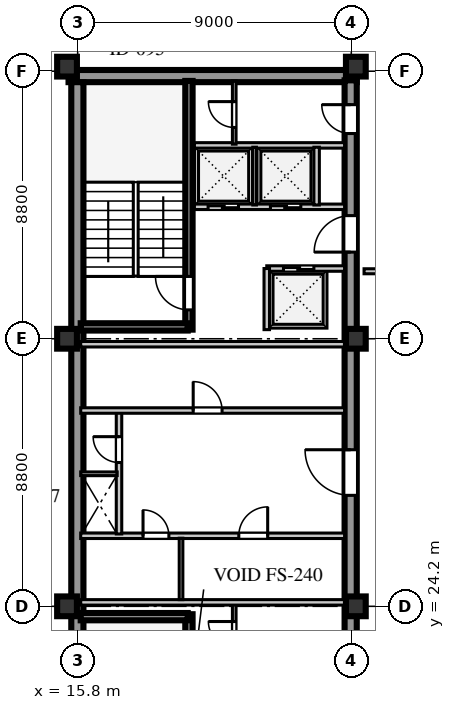
"""IFC4 building model, lengths in metres.
Left out: names, types, materials, properties, quantities, classifications, styles, units other than length and angle.
Written with IfcOpenShell. Run it as: python <this file> out.ifc"""

import sys

from ifc_helpers import new_model, si_unit, direction, frame, frame_2d, origin, origin_2d, place, context, subcontext, project, spatial, rectangle, extrude, element, fill, save


model = new_model("IFC4")
c1 = context("Model", 3, precision=1e-05, world=origin(), true_north=direction((0.0, 1.0)))
c2 = subcontext(c1, "Body", "Model", "MODEL_VIEW")
j1 = project(units=[si_unit("LENGTHUNIT", "METRE"), si_unit("PLANEANGLEUNIT", "RADIAN")], contexts=[c1])
p1 = place(None, origin())
s1 = spatial("IfcSite", under=j1, at=p1, CompositionType="ELEMENT")
p2 = place(p1, origin())
s2 = spatial("IfcBuilding", under=s1, at=p2, CompositionType="ELEMENT")
p3 = place(p2, frame((0.0, 0.0, 253.1)))
s3 = spatial("IfcBuildingStorey", under=s2, at=p3, CompositionType="ELEMENT", Elevation=253.1)
p4 = place(p3, frame((15.5, 41.64, 0.0), z_axis=(0.0, 0.0, 1.0), x_axis=(1.0, 0.0, 0.0)))
e1 = element("IfcWall", 1, at=p4, inside=s3, PredefinedType="SHEAR", context=c2, shape_type="SweptSolid", body=[
    extrude(rectangle(XDim=9.48, YDim=0.4, at=frame_2d((4.74, 0.0))), origin(), (0.0, 0.0, 1.0), 3.66),
])
p5 = place(p3, frame((15.79, 15.81, 0.0), z_axis=(0.0, 0.0, 1.0), x_axis=(0.0, 1.0, 0.0)))
e2 = element("IfcWall", 2, at=p5, inside=s3, PredefinedType="SHEAR", context=c2, shape_type="SweptSolid", body=[
    extrude(rectangle(XDim=25.63, YDim=0.4, at=frame_2d((12.815, 0.0))), origin(), (0.0, 0.0, 1.0), 3.66),
])
p6 = place(p3, frame((24.78, 15.74, 0.0), z_axis=(0.0, 0.0, 1.0), x_axis=(0.0, 1.0, 0.0)))
e3 = element("IfcWall", 3, at=p6, inside=s3, PredefinedType="SHEAR", context=c2, shape_type="SweptSolid", body=[
    extrude(rectangle(XDim=25.76, YDim=0.4, at=frame_2d((12.88, 0.0))), origin(), (0.0, 0.0, 1.0), 3.66),
])
p7 = place(p6, frame((1.61, 0.0, 0.0)))
e4 = element("IfcOpeningElement", 4, at=p7, cuts=e3, PredefinedType="OPENING", context=c2, shape_type="SweptSolid", body=[
    extrude(rectangle(XDim=1.2, YDim=2.1, at=frame_2d((0.6, 1.05))), frame((0.0, 0.21, 0.0), z_axis=(0.0, -1.0, 0.0), x_axis=(1.0, 0.0, 0.0)), (0.0, 0.0, 1.0), 0.42),
])
p8 = place(p6, frame((6.78, 0.0, 0.0)))
e5 = element("IfcOpeningElement", 5, at=p8, cuts=e3, PredefinedType="OPENING", context=c2, shape_type="SweptSolid", body=[
    extrude(rectangle(XDim=0.85, YDim=2.06, at=frame_2d((0.425, 1.03))), frame((0.0, 0.21, 0.0), z_axis=(0.0, -1.0, 0.0), x_axis=(1.0, 0.0, 0.0)), (0.0, 0.0, 1.0), 0.42),
])
p9 = place(p6, frame((12.11, 0.0, 0.0)))
e6 = element("IfcOpeningElement", 6, at=p9, cuts=e3, PredefinedType="OPENING", context=c2, shape_type="SweptSolid", body=[
    extrude(rectangle(XDim=1.5, YDim=2.12, at=frame_2d((0.75, 1.06))), frame((0.0, 0.21, 0.0), z_axis=(0.0, -1.0, 0.0), x_axis=(1.0, 0.0, 0.0)), (0.0, 0.0, 1.0), 0.42),
])
p10 = place(p6, frame((20.11, 0.0, 0.0)))
e7 = element("IfcOpeningElement", 7, at=p10, cuts=e3, PredefinedType="OPENING", context=c2, shape_type="SweptSolid", body=[
    extrude(rectangle(XDim=1.2, YDim=2.12, at=frame_2d((0.6, 1.06))), frame((0.0, 0.21, 0.0), z_axis=(0.0, -1.0, 0.0), x_axis=(1.0, 0.0, 0.0)), (0.0, 0.0, 1.0), 0.42),
])
p11 = place(p6, frame((24.01, 0.0, 0.0)))
e8 = element("IfcOpeningElement", 8, at=p11, cuts=e3, PredefinedType="OPENING", context=c2, shape_type="SweptSolid", body=[
    extrude(rectangle(XDim=0.95, YDim=2.1, at=frame_2d((0.475, 1.05))), frame((0.0, 0.21, 0.0), z_axis=(0.0, -1.0, 0.0), x_axis=(1.0, 0.0, 0.0)), (0.0, 0.0, 1.0), 0.42),
])
for number, where, z_axis, x_axis in (
    (9, (15.45, 24.2, 0.0), (0.0, 0.0, 1.0), (1.0, 0.0, 0.0)),
    (10, (15.45, 33.0, 0.0), (0.0, 0.0, 1.0), (1.0, 0.0, 0.0)),
    (11, (15.45, 41.95, 0.0), (0.0, 0.0, 1.0), (1.0, 0.0, 0.0)),
    (12, (24.95, 24.2, 0.0), (0.0, 0.0, 1.0), (1.0, 0.0, 0.0)),
    (13, (24.95, 33.0, 0.0), (0.0, 0.0, 1.0), (1.0, 0.0, 0.0)),
    (14, (24.95, 41.95, 0.0), (0.0, 0.0, 1.0), (1.0, 0.0, 0.0)),
):
    element("IfcColumn", number, at=place(p3, frame(where, z_axis=z_axis, x_axis=x_axis)), inside=s3, PredefinedType="COLUMN", context=c2, shape_type="SweptSolid", body=[
        extrude(rectangle(XDim=0.65, YDim=0.65, at=origin_2d()), origin(), (0.0, 0.0, 1.0), 3.66),
    ])
p12 = place(p3, frame((19.46, 15.74, 0.0), z_axis=(0.0, 0.0, 1.0), x_axis=(0.0, 1.0, 0.0)))
e15 = element("IfcWall", 15, at=p12, inside=s3, PredefinedType="SHEAR", context=c2, shape_type="SweptSolid", body=[
    extrude(rectangle(XDim=8.2, YDim=0.24, at=frame_2d((4.1, 0.0))), origin(), (0.0, 0.0, 1.0), 3.9),
])
p13 = place(p12, frame((0.45, 0.0, 0.0)))
e16 = element("IfcOpeningElement", 16, at=p13, cuts=e15, PredefinedType="OPENING", context=c2, shape_type="SweptSolid", body=[
    extrude(rectangle(XDim=1.1, YDim=2.1, at=frame_2d((0.55, 1.05))), frame((0.0, 0.13, 0.0), z_axis=(0.0, -1.0, 0.0), x_axis=(1.0, 0.0, 0.0)), (0.0, 0.0, 1.0), 0.26),
])
p14 = place(p3, frame((15.9, 23.86, 0.0), z_axis=(0.0, 0.0, 1.0), x_axis=(1.0, 0.0, 0.0)))
e17 = element("IfcWall", 17, at=p14, inside=s3, PredefinedType="SHEAR", context=c2, shape_type="SweptSolid", body=[
    extrude(rectangle(XDim=3.52, YDim=0.24, at=frame_2d((1.76, 0.0))), origin(), (0.0, 0.0, 1.0), 3.9),
])
p15 = place(p3, frame((20.95, 22.4, 0.0), z_axis=(0.0, 0.0, 1.0), x_axis=(0.0, 1.0, 0.0)))
e18 = element("IfcWall", 18, at=p15, inside=s3, PredefinedType="PARTITIONING", context=c2, shape_type="SweptSolid", body=[
    extrude(rectangle(XDim=1.88, YDim=0.12, at=frame_2d((0.94, 0.0))), origin(), (0.0, 0.0, 1.0), 3.66),
])
p16 = place(p15, frame((0.45, 0.0, 0.0)))
e19 = element("IfcOpeningElement", 19, at=p16, cuts=e18, PredefinedType="OPENING", context=c2, shape_type="SweptSolid", body=[
    extrude(rectangle(XDim=0.85, YDim=2.06, at=frame_2d((0.425, 1.03))), frame((0.0, 0.07, 0.0), z_axis=(0.0, -1.0, 0.0), x_axis=(1.0, 0.0, 0.0)), (0.0, 0.0, 1.0), 0.14),
])
p17 = place(p3, frame((15.9, 26.52, 0.0), z_axis=(0.0, 0.0, 1.0), x_axis=(1.0, 0.0, 0.0)))
e20 = element("IfcWall", 20, at=p17, inside=s3, PredefinedType="SOLIDWALL", context=c2, shape_type="SweptSolid", body=[
    extrude(rectangle(XDim=8.68, YDim=0.18, at=frame_2d((4.34, 0.0))), origin(), (0.0, 0.0, 1.0), 3.66),
])
p18 = place(p17, frame((2.05, 0.0, 0.0)))
e21 = element("IfcOpeningElement", 21, at=p18, cuts=e20, PredefinedType="OPENING", context=c2, shape_type="SweptSolid", body=[
    extrude(rectangle(XDim=0.85, YDim=2.06, at=frame_2d((0.425, 1.03))), frame((0.0, 0.1, 0.0), z_axis=(0.0, -1.0, 0.0), x_axis=(1.0, 0.0, 0.0)), (0.0, 0.0, 1.0), 0.2),
])
p19 = place(p17, frame((5.2, 0.0, 0.0)))
e22 = element("IfcOpeningElement", 22, at=p19, cuts=e20, PredefinedType="OPENING", context=c2, shape_type="SweptSolid", body=[
    extrude(rectangle(XDim=0.95, YDim=2.1, at=frame_2d((0.475, 1.05))), frame((0.0, 0.1, 0.0), z_axis=(0.0, -1.0, 0.0), x_axis=(1.0, 0.0, 0.0)), (0.0, 0.0, 1.0), 0.2),
])
p20 = place(p3, frame((15.9, 24.33, 0.0), z_axis=(0.0, 0.0, 1.0), x_axis=(1.0, 0.0, 0.0)))
e23 = element("IfcWall", 23, at=p20, inside=s3, PredefinedType="SOLIDWALL", context=c2, shape_type="SweptSolid", body=[
    extrude(rectangle(XDim=8.68, YDim=0.18, at=frame_2d((4.34, 0.0))), origin(), (0.0, 0.0, 1.0), 3.06),
])
p21 = place(p3, frame((19.2, 24.42, 0.0), z_axis=(0.0, 0.0, 1.0), x_axis=(0.0, 1.0, 0.0)))
e24 = element("IfcWall", 24, at=p21, inside=s3, PredefinedType="PARTITIONING", context=c2, shape_type="SweptSolid", body=[
    extrude(rectangle(XDim=2.02, YDim=0.12, at=frame_2d((1.01, 0.0))), origin(), (0.0, 0.0, 1.0), 3.66),
])
p22 = place(p3, frame((17.16, 26.58, 0.0), z_axis=(0.0, 0.0, 1.0), x_axis=(0.0, 1.0, 0.0)))
e25 = element("IfcWall", 25, at=p22, inside=s3, PredefinedType="SOLIDWALL", context=c2, shape_type="SweptSolid", body=[
    extrude(rectangle(XDim=4.02, YDim=0.18, at=frame_2d((2.01, 0.0))), origin(), (0.0, 0.0, 1.0), 3.66),
])
p23 = place(p22, frame((2.35, 0.0, 0.0)))
e26 = element("IfcOpeningElement", 26, at=p23, cuts=e25, PredefinedType="OPENING", context=c2, shape_type="SweptSolid", body=[
    extrude(rectangle(XDim=0.85, YDim=2.06, at=frame_2d((0.425, 1.03))), frame((0.0, 0.1, 0.0), z_axis=(0.0, -1.0, 0.0), x_axis=(1.0, 0.0, 0.0)), (0.0, 0.0, 1.0), 0.2),
])
p24 = place(p3, frame((15.9, 28.56, 0.0), z_axis=(0.0, 0.0, 1.0), x_axis=(1.0, 0.0, 0.0)))
e27 = element("IfcWall", 27, at=p24, inside=s3, PredefinedType="PARTITIONING", context=c2, shape_type="SweptSolid", body=[
    extrude(rectangle(XDim=1.2, YDim=0.12, at=frame_2d((0.6, 0.0))), origin(), (0.0, 0.0, 1.0), 3.66),
])
p25 = place(p3, frame((15.9, 30.64, 0.0), z_axis=(0.0, 0.0, 1.0), x_axis=(1.0, 0.0, 0.0)))
e28 = element("IfcWall", 28, at=p25, inside=s3, PredefinedType="SOLIDWALL", context=c2, shape_type="SweptSolid", body=[
    extrude(rectangle(XDim=8.68, YDim=0.18, at=frame_2d((4.34, 0.0))), origin(), (0.0, 0.0, 1.0), 3.66),
])
p26 = place(p25, frame((3.7, 0.0, 0.0)))
e29 = element("IfcOpeningElement", 29, at=p26, cuts=e28, PredefinedType="OPENING", context=c2, shape_type="SweptSolid", body=[
    extrude(rectangle(XDim=0.95, YDim=2.1, at=frame_2d((0.475, 1.05))), frame((0.0, 0.1, 0.0), z_axis=(0.0, -1.0, 0.0), x_axis=(1.0, 0.0, 0.0)), (0.0, 0.0, 1.0), 0.2),
])
p27 = place(p3, frame((15.9, 32.82, 0.0), z_axis=(0.0, 0.0, 1.0), x_axis=(1.0, 0.0, 0.0)))
e30 = element("IfcWall", 30, at=p27, inside=s3, PredefinedType="SOLIDWALL", context=c2, shape_type="SweptSolid", body=[
    extrude(rectangle(XDim=8.68, YDim=0.18, at=frame_2d((4.34, 0.0))), origin(), (0.0, 0.0, 1.0), 3.06),
])
p28 = place(p3, frame((19.46, 33.3, 0.0), z_axis=(0.0, 0.0, 1.0), x_axis=(0.0, 1.0, 0.0)))
e31 = element("IfcWall", 31, at=p28, inside=s3, PredefinedType="SHEAR", context=c2, shape_type="SweptSolid", body=[
    extrude(rectangle(XDim=8.18, YDim=0.24, at=frame_2d((4.09, 0.0))), origin(), (0.0, 0.0, 1.0), 3.9),
])
p29 = place(p28, frame((0.65, 0.0, 0.0)))
e32 = element("IfcOpeningElement", 32, at=p29, cuts=e31, PredefinedType="OPENING", context=c2, shape_type="SweptSolid", body=[
    extrude(rectangle(XDim=1.1, YDim=2.1, at=frame_2d((0.55, 1.05))), frame((0.0, 0.13, 0.0), z_axis=(0.0, -1.0, 0.0), x_axis=(1.0, 0.0, 0.0)), (0.0, 0.0, 1.0), 0.26),
])
p30 = place(p3, frame((15.9, 33.39, 0.0), z_axis=(0.0, 0.0, 1.0), x_axis=(1.0, 0.0, 0.0)))
e33 = element("IfcWall", 33, at=p30, inside=s3, PredefinedType="SHEAR", context=c2, shape_type="SweptSolid", body=[
    extrude(rectangle(XDim=3.52, YDim=0.24, at=frame_2d((1.76, 0.0))), origin(), (0.0, 0.0, 1.0), 3.9),
])
p31 = place(p3, frame((22.02, 35.31, 0.0), z_axis=(0.0, 0.0, 1.0), x_axis=(1.0, 0.0, 0.0)))
e34 = element("IfcWall", 34, at=p31, inside=s3, PredefinedType="SOLIDWALL", context=c2, shape_type="SweptSolid", body=[
    extrude(rectangle(XDim=2.56, YDim=0.18, at=frame_2d((1.28, 0.0))), origin(), (0.0, 0.0, 1.0), 3.66),
])
p32 = place(p31, frame((0.55, 0.0, 0.0)))
e35 = element("IfcOpeningElement", 35, at=p32, cuts=e34, PredefinedType="OPENING", context=c2, shape_type="SweptSolid", body=[
    extrude(rectangle(XDim=1.0, YDim=2.1, at=frame_2d((0.5, 1.05))), frame((0.0, 0.1, 0.0), z_axis=(0.0, -1.0, 0.0), x_axis=(1.0, 0.0, 0.0)), (0.0, 0.0, 1.0), 0.2),
])
p33 = place(p3, frame((22.02, 33.3, 0.0), z_axis=(0.0, 0.0, 1.0), x_axis=(0.0, 1.0, 0.0)))
e36 = element("IfcWall", 36, at=p33, inside=s3, PredefinedType="SOLIDWALL", context=c2, shape_type="SweptSolid", body=[
    extrude(rectangle(XDim=2.01, YDim=0.18, at=frame_2d((1.005, 0.0))), origin(), (0.0, 0.0, 1.0), 3.66),
])
p34 = place(p3, frame((19.64, 37.34, 0.0), z_axis=(0.0, 0.0, 1.0), x_axis=(1.0, 0.0, 0.0)))
e37 = element("IfcWall", 37, at=p34, inside=s3, PredefinedType="SOLIDWALL", context=c2, shape_type="SweptSolid", body=[
    extrude(rectangle(XDim=4.94, YDim=0.18, at=frame_2d((2.47, 0.0))), origin(), (0.0, 0.0, 1.0), 3.66),
])
p35 = place(p34, frame((0.45, 0.0, 0.0)))
e38 = element("IfcOpeningElement", 38, at=p35, cuts=e37, PredefinedType="OPENING", context=c2, shape_type="SweptSolid", body=[
    extrude(rectangle(XDim=1.0, YDim=2.1, at=frame_2d((0.5, 1.05))), frame((0.0, 0.1, 0.0), z_axis=(0.0, -1.0, 0.0), x_axis=(1.0, 0.0, 0.0)), (0.0, 0.0, 1.0), 0.2),
])
p36 = place(p34, frame((2.5, 0.0, 0.0)))
e39 = element("IfcOpeningElement", 39, at=p36, cuts=e37, PredefinedType="OPENING", context=c2, shape_type="SweptSolid", body=[
    extrude(rectangle(XDim=1.0, YDim=2.1, at=frame_2d((0.5, 1.05))), frame((0.0, 0.1, 0.0), z_axis=(0.0, -1.0, 0.0), x_axis=(1.0, 0.0, 0.0)), (0.0, 0.0, 1.0), 0.2),
])
p37 = place(p3, frame((19.64, 39.36, 0.0), z_axis=(0.0, 0.0, 1.0), x_axis=(1.0, 0.0, 0.0)))
e40 = element("IfcWall", 40, at=p37, inside=s3, PredefinedType="SOLIDWALL", context=c2, shape_type="SweptSolid", body=[
    extrude(rectangle(XDim=4.94, YDim=0.18, at=frame_2d((2.47, 0.0))), origin(), (0.0, 0.0, 1.0), 3.66),
])
p38 = place(p3, frame((21.62, 37.4, 0.0), z_axis=(0.0, 0.0, 1.0), x_axis=(0.0, 1.0, 0.0)))
e41 = element("IfcWall", 41, at=p38, inside=s3, PredefinedType="PARTITIONING", context=c2, shape_type="SweptSolid", body=[
    extrude(rectangle(XDim=1.9, YDim=0.12, at=frame_2d((0.95, 0.0))), origin(), (0.0, 0.0, 1.0), 3.66),
])
p39 = place(p3, frame((23.66, 37.4, 0.0), z_axis=(0.0, 0.0, 1.0), x_axis=(0.0, 1.0, 0.0)))
e42 = element("IfcWall", 42, at=p39, inside=s3, PredefinedType="SOLIDWALL", context=c2, shape_type="SweptSolid", body=[
    extrude(rectangle(XDim=1.9, YDim=0.18, at=frame_2d((0.95, 0.0))), origin(), (0.0, 0.0, 1.0), 3.66),
])
p40 = place(p3, frame((20.95, 39.4, 0.0), z_axis=(0.0, 0.0, 1.0), x_axis=(0.0, 1.0, 0.0)))
e43 = element("IfcWall", 43, at=p40, inside=s3, PredefinedType="PARTITIONING", context=c2, shape_type="SweptSolid", body=[
    extrude(rectangle(XDim=2.08, YDim=0.12, at=frame_2d((1.04, 0.0))), origin(), (0.0, 0.0, 1.0), 3.66),
])
p41 = place(p40, frame((0.55, 0.0, 0.0)))
e44 = element("IfcOpeningElement", 44, at=p41, cuts=e43, PredefinedType="OPENING", context=c2, shape_type="SweptSolid", body=[
    extrude(rectangle(XDim=0.85, YDim=2.06, at=frame_2d((0.425, 1.03))), frame((0.0, 0.07, 0.0), z_axis=(0.0, -1.0, 0.0), x_axis=(1.0, 0.0, 0.0)), (0.0, 0.0, 1.0), 0.14),
])
p42 = place(p3, frame((25.22, 35.22, 0.0), z_axis=(0.0, 0.0, 1.0), x_axis=(1.0, 0.0, 0.0)))
e45 = element("IfcWall", 45, at=p42, inside=s3, PredefinedType="PARTITIONING", context=c2, shape_type="SweptSolid", body=[
    extrude(rectangle(XDim=9.5, YDim=0.165, at=frame_2d((4.75, 0.0))), origin(), (0.0, 0.0, 1.0), 3.66),
])
p43 = place(p42, frame((1.1, 0.0, 0.0)))
e46 = element("IfcOpeningElement", 46, at=p43, cuts=e45, PredefinedType="OPENING", context=c2, shape_type="SweptSolid", body=[
    extrude(rectangle(XDim=0.95, YDim=2.1, at=frame_2d((0.475, 1.05))), frame((0.0, 0.093, 0.0), z_axis=(0.0, -1.0, 0.0), x_axis=(1.0, 0.0, 0.0)), (0.0, 0.0, 1.0), 0.185),
])
p44 = place(p16, origin())
e47 = element("IfcDoor", 47, at=p44, inside=s3, OperationType="SINGLE_SWING_RIGHT", PredefinedType="DOOR", context=c2, shape_type="SweptSolid", body=[
    extrude(rectangle(XDim=0.85, YDim=2.06, at=frame_2d((0.425, 1.03))), frame((0.0, 0.025, 0.0), z_axis=(0.0, -1.0, 0.0), x_axis=(1.0, 0.0, 0.0)), (0.0, 0.0, 1.0), 0.05),
])
fill(e19, e47)
p45 = place(p18, origin())
e48 = element("IfcDoor", 48, at=p45, inside=s3, OperationType="SINGLE_SWING_LEFT", PredefinedType="DOOR", context=c2, shape_type="SweptSolid", body=[
    extrude(rectangle(XDim=0.85, YDim=2.06, at=frame_2d((0.425, 1.03))), frame((0.0, 0.025, 0.0), z_axis=(0.0, -1.0, 0.0), x_axis=(1.0, 0.0, 0.0)), (0.0, 0.0, 1.0), 0.05),
])
fill(e21, e48)
p46 = place(p19, origin())
e49 = element("IfcDoor", 49, at=p46, inside=s3, OperationType="SINGLE_SWING_RIGHT", PredefinedType="DOOR", context=c2, shape_type="SweptSolid", body=[
    extrude(rectangle(XDim=0.95, YDim=2.1, at=frame_2d((0.475, 1.05))), frame((0.0, 0.025, 0.0), z_axis=(0.0, -1.0, 0.0), x_axis=(1.0, 0.0, 0.0)), (0.0, 0.0, 1.0), 0.05),
])
fill(e22, e49)
p47 = place(p23, origin())
e50 = element("IfcDoor", 50, at=p47, inside=s3, OperationType="SINGLE_SWING_RIGHT", PredefinedType="DOOR", context=c2, shape_type="SweptSolid", body=[
    extrude(rectangle(XDim=0.85, YDim=2.06, at=frame_2d((0.425, 1.03))), frame((0.0, 0.025, 0.0), z_axis=(0.0, -1.0, 0.0), x_axis=(1.0, 0.0, 0.0)), (0.0, 0.0, 1.0), 0.05),
])
fill(e26, e50)
p48 = place(p9, frame((1.5, 0.0, 0.0), z_axis=(0.0, 0.0, 1.0), x_axis=(-1.0, 0.0, 0.0)))
e51 = element("IfcDoor", 51, at=p48, inside=s3, OperationType="SINGLE_SWING_LEFT", PredefinedType="DOOR", context=c2, shape_type="SweptSolid", body=[
    extrude(rectangle(XDim=1.5, YDim=2.12, at=frame_2d((0.75, 1.06))), frame((0.0, 0.025, 0.0), z_axis=(0.0, -1.0, 0.0), x_axis=(1.0, 0.0, 0.0)), (0.0, 0.0, 1.0), 0.05),
])
fill(e6, e51)
p49 = place(p26, frame((0.95, 0.0, 0.0), z_axis=(0.0, 0.0, 1.0), x_axis=(-1.0, 0.0, 0.0)))
e52 = element("IfcDoor", 52, at=p49, inside=s3, OperationType="SINGLE_SWING_RIGHT", PredefinedType="DOOR", context=c2, shape_type="SweptSolid", body=[
    extrude(rectangle(XDim=0.95, YDim=2.1, at=frame_2d((0.475, 1.05))), frame((0.0, 0.025, 0.0), z_axis=(0.0, -1.0, 0.0), x_axis=(1.0, 0.0, 0.0)), (0.0, 0.0, 1.0), 0.05),
])
fill(e29, e52)
p50 = place(p29, origin())
e53 = element("IfcDoor", 53, at=p50, inside=s3, OperationType="SINGLE_SWING_RIGHT", PredefinedType="DOOR", context=c2, shape_type="SweptSolid", body=[
    extrude(rectangle(XDim=1.1, YDim=2.1, at=frame_2d((0.55, 1.05))), frame((0.0, 0.025, 0.0), z_axis=(0.0, -1.0, 0.0), x_axis=(1.0, 0.0, 0.0)), (0.0, 0.0, 1.0), 0.05),
])
fill(e32, e53)
p51 = place(p10, frame((1.2, 0.0, 0.0), z_axis=(0.0, 0.0, 1.0), x_axis=(-1.0, 0.0, 0.0)))
e54 = element("IfcDoor", 54, at=p51, inside=s3, OperationType="SINGLE_SWING_RIGHT", PredefinedType="DOOR", context=c2, shape_type="SweptSolid", body=[
    extrude(rectangle(XDim=1.2, YDim=2.12, at=frame_2d((0.6, 1.06))), frame((0.0, 0.025, 0.0), z_axis=(0.0, -1.0, 0.0), x_axis=(1.0, 0.0, 0.0)), (0.0, 0.0, 1.0), 0.05),
])
fill(e7, e54)
p52 = place(p35, frame((1.0, 0.0, 0.0), z_axis=(0.0, 0.0, 1.0), x_axis=(-1.0, 0.0, 0.0)))
e55 = element("IfcDoor", 55, at=p52, inside=s3, OperationType="DOUBLE_DOOR_SLIDING", PredefinedType="DOOR", context=c2, shape_type="SweptSolid", body=[
    extrude(rectangle(XDim=1.0, YDim=2.1, at=frame_2d((0.5, 1.05))), frame((0.0, 0.025, 0.0), z_axis=(0.0, -1.0, 0.0), x_axis=(1.0, 0.0, 0.0)), (0.0, 0.0, 1.0), 0.05),
])
fill(e38, e55)
p53 = place(p36, frame((1.0, 0.0, 0.0), z_axis=(0.0, 0.0, 1.0), x_axis=(-1.0, 0.0, 0.0)))
e56 = element("IfcDoor", 56, at=p53, inside=s3, OperationType="DOUBLE_DOOR_SLIDING", PredefinedType="DOOR", context=c2, shape_type="SweptSolid", body=[
    extrude(rectangle(XDim=1.0, YDim=2.1, at=frame_2d((0.5, 1.05))), frame((0.0, 0.025, 0.0), z_axis=(0.0, -1.0, 0.0), x_axis=(1.0, 0.0, 0.0)), (0.0, 0.0, 1.0), 0.05),
])
fill(e39, e56)
p54 = place(p32, origin())
e57 = element("IfcDoor", 57, at=p54, inside=s3, OperationType="DOUBLE_DOOR_SLIDING", PredefinedType="DOOR", context=c2, shape_type="SweptSolid", body=[
    extrude(rectangle(XDim=1.0, YDim=2.1, at=frame_2d((0.5, 1.05))), frame((0.0, 0.025, 0.0), z_axis=(0.0, -1.0, 0.0), x_axis=(1.0, 0.0, 0.0)), (0.0, 0.0, 1.0), 0.05),
])
fill(e35, e57)
p55 = place(p41, origin())
e58 = element("IfcDoor", 58, at=p55, inside=s3, OperationType="SINGLE_SWING_RIGHT", PredefinedType="DOOR", context=c2, shape_type="SweptSolid", body=[
    extrude(rectangle(XDim=0.85, YDim=2.06, at=frame_2d((0.425, 1.03))), frame((0.0, 0.025, 0.0), z_axis=(0.0, -1.0, 0.0), x_axis=(1.0, 0.0, 0.0)), (0.0, 0.0, 1.0), 0.05),
])
fill(e44, e58)
p56 = place(p11, frame((0.95, 0.0, 0.0), z_axis=(0.0, 0.0, 1.0), x_axis=(-1.0, 0.0, 0.0)))
e59 = element("IfcDoor", 59, at=p56, inside=s3, OperationType="SINGLE_SWING_LEFT", PredefinedType="DOOR", context=c2, shape_type="SweptSolid", body=[
    extrude(rectangle(XDim=0.95, YDim=2.1, at=frame_2d((0.475, 1.05))), frame((0.0, 0.025, 0.0), z_axis=(0.0, -1.0, 0.0), x_axis=(1.0, 0.0, 0.0)), (0.0, 0.0, 1.0), 0.05),
])
fill(e8, e59)
save(model, sys.argv[1])
